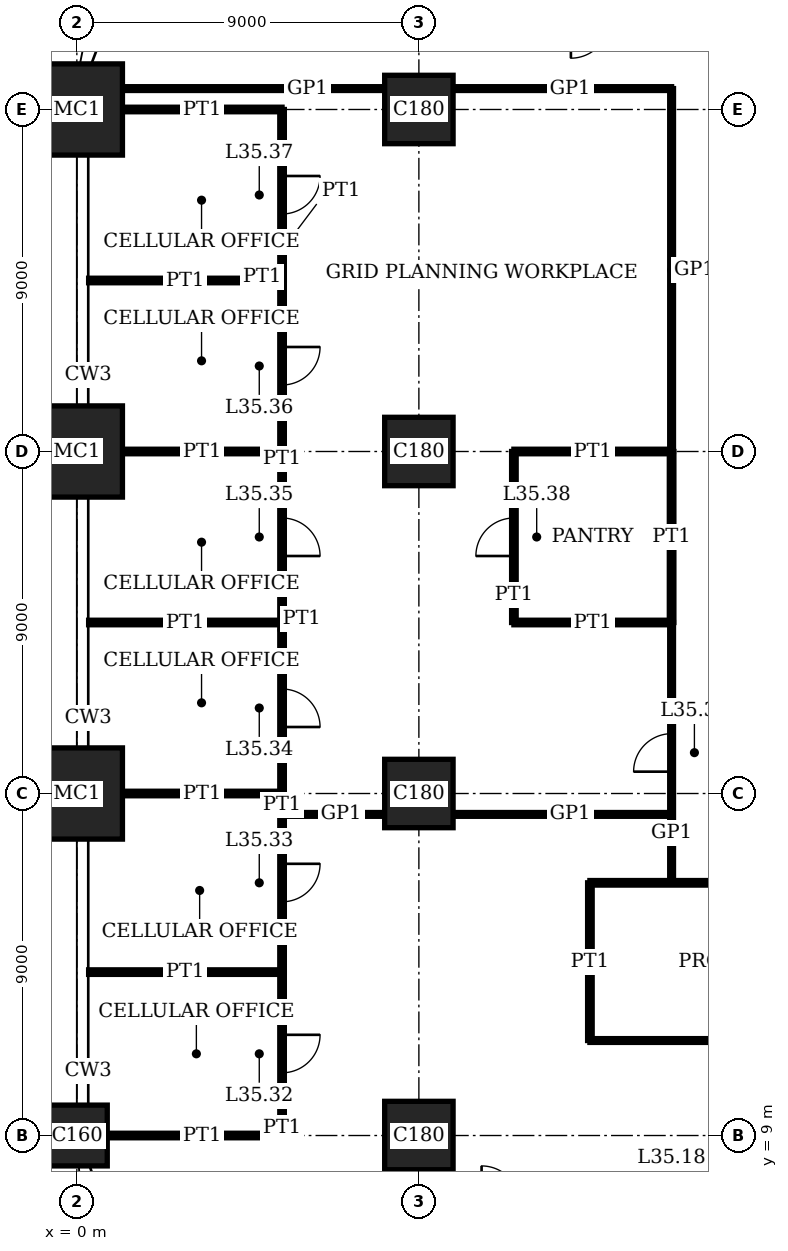
"""IFC4 building model, lengths in metres.
Left out: names, types, materials, properties, quantities, classifications, styles, units other than length and angle.
Written with IfcOpenShell. Run it as: python <this file> out.ifc"""

import sys

from ifc_helpers import new_model, si_unit, direction, frame, frame_2d, origin, origin_2d, place, context, subcontext, project, spatial, rectangle, extrude, element, fill, save


model = new_model("IFC4")
c1 = context("Model", 3, precision=1e-05, world=origin(), true_north=direction((0.0, 1.0)))
c2 = subcontext(c1, "Body", "Model", "MODEL_VIEW")
j1 = project(units=[si_unit("LENGTHUNIT", "METRE"), si_unit("PLANEANGLEUNIT", "RADIAN")], contexts=[c1])
p1 = place(None, origin())
s1 = spatial("IfcSite", under=j1, at=p1, CompositionType="ELEMENT")
p2 = place(p1, origin())
s2 = spatial("IfcBuilding", under=s1, at=p2, CompositionType="ELEMENT")
p3 = place(p2, frame((0.0, 0.0, 145.0)))
s3 = spatial("IfcBuildingStorey", under=s2, at=p3, CompositionType="ELEMENT", Elevation=145.0)
p4 = place(p3, frame((0.0, 9.0, 0.0), z_axis=(0.0, 0.0, 1.0), x_axis=(1.0, 0.0, 0.0)))
e1 = element("IfcColumn", 1, at=p4, inside=s3, PredefinedType="COLUMN", context=c2, shape_type="SweptSolid", body=[
    extrude(rectangle(XDim=1.6, YDim=1.6, at=origin_2d()), origin(), (0.0, 0.0, 1.0), 4.0),
])
for number, where, z_axis, x_axis in (
    (2, (0.0, 18.0, 0.0), (0.0, 0.0, 1.0), (1.0, 0.0, 0.0)),
    (3, (0.0, 27.0, 0.0), (0.0, 0.0, 1.0), (1.0, 0.0, 0.0)),
    (4, (0.0, 36.0, 0.0), (0.0, 0.0, 1.0), (1.0, 0.0, 0.0)),
):
    element("IfcColumn", number, at=place(p3, frame(where, z_axis=z_axis, x_axis=x_axis)), inside=s3, PredefinedType="COLUMN", context=c2, shape_type="SweptSolid", body=[
        extrude(rectangle(XDim=2.4, YDim=2.4, at=origin_2d()), origin(), (0.0, 0.0, 1.0), 4.0),
    ])
for number, where, z_axis, x_axis in (
    (5, (9.0, 9.0, 0.0), (0.0, 0.0, 1.0), (1.0, 0.0, 0.0)),
    (6, (9.0, 18.0, 0.0), (0.0, 0.0, 1.0), (1.0, 0.0, 0.0)),
    (7, (9.0, 27.0, 0.0), (0.0, 0.0, 1.0), (1.0, 0.0, 0.0)),
    (8, (9.0, 36.0, 0.0), (0.0, 0.0, 1.0), (1.0, 0.0, 0.0)),
):
    element("IfcColumn", number, at=place(p3, frame(where, z_axis=z_axis, x_axis=x_axis)), inside=s3, PredefinedType="COLUMN", context=c2, shape_type="SweptSolid", body=[
        extrude(rectangle(XDim=1.8, YDim=1.8, at=origin_2d()), origin(), (0.0, 0.0, 1.0), 4.0),
    ])
p5 = place(p3, frame((0.8, 9.0, 0.0), z_axis=(0.0, 0.0, 1.0), x_axis=(1.0, 0.0, 0.0)))
e9 = element("IfcWall", 9, at=p5, inside=s3, PredefinedType="PARTITIONING", context=c2, shape_type="SweptSolid", body=[
    extrude(rectangle(XDim=4.6, YDim=0.12, at=frame_2d((2.3, 0.0))), origin(), (0.0, 0.0, 1.0), 3.05),
])
p6 = place(p3, frame((13.5, 11.5, 0.0), z_axis=(0.0, 0.0, 1.0), x_axis=(1.0, 0.0, 0.0)))
e10 = element("IfcWall", 10, at=p6, inside=s3, PredefinedType="PARTITIONING", context=c2, shape_type="SweptSolid", body=[
    extrude(rectangle(XDim=9.0, YDim=0.1, at=frame_2d((4.5, 0.0))), origin(), (0.0, 0.0, 1.0), 3.75),
])
p7 = place(p6, frame((4.0, 0.0, 0.0)))
e11 = element("IfcOpeningElement", 11, at=p7, cuts=e10, PredefinedType="OPENING", context=c2, shape_type="SweptSolid", body=[
    extrude(rectangle(XDim=1.0, YDim=2.4, at=frame_2d((0.5, 1.2))), frame((0.0, 0.06, 0.0), z_axis=(0.0, -1.0, 0.0), x_axis=(1.0, 0.0, 0.0)), (0.0, 0.0, 1.0), 0.12),
])
p8 = place(p3, frame((0.31, 13.3, 0.0), z_axis=(0.0, 0.0, 1.0), x_axis=(1.0, 0.0, 0.0)))
e12 = element("IfcWall", 12, at=p8, inside=s3, PredefinedType="PARTITIONING", context=c2, shape_type="SweptSolid", body=[
    extrude(rectangle(XDim=5.09, YDim=0.12, at=frame_2d((2.545, 0.0))), origin(), (0.0, 0.0, 1.0), 3.1),
])
p9 = place(p3, frame((13.5, 15.65, 0.0), z_axis=(0.0, 0.0, 1.0), x_axis=(1.0, 0.0, 0.0)))
e13 = element("IfcWall", 13, at=p9, inside=s3, PredefinedType="PARTITIONING", context=c2, shape_type="SweptSolid", body=[
    extrude(rectangle(XDim=9.0, YDim=0.12, at=frame_2d((4.5, 0.0))), origin(), (0.0, 0.0, 1.0), 3.75),
])
p10 = place(p3, frame((5.39, 17.45, 0.0), z_axis=(0.0, 0.0, 1.0), x_axis=(1.0, 0.0, 0.0)))
e14 = element("IfcWall", 14, at=p10, inside=s3, PredefinedType="PARTITIONING", context=c2, shape_type="SweptSolid", body=[
    extrude(rectangle(XDim=2.71, YDim=0.1, at=frame_2d((1.355, 0.0))), origin(), (0.0, 0.0, 1.0), 3.05),
])
p11 = place(p3, frame((9.9, 17.45, 0.0), z_axis=(0.0, 0.0, 1.0), x_axis=(1.0, 0.0, 0.0)))
e15 = element("IfcWall", 15, at=p11, inside=s3, PredefinedType="PARTITIONING", context=c2, shape_type="SweptSolid", body=[
    extrude(rectangle(XDim=5.75, YDim=0.1, at=frame_2d((2.875, 0.0))), origin(), (0.0, 0.0, 1.0), 3.05),
])
p12 = place(p3, frame((1.2, 18.0, 0.0), z_axis=(0.0, 0.0, 1.0), x_axis=(1.0, 0.0, 0.0)))
e16 = element("IfcWall", 16, at=p12, inside=s3, PredefinedType="PARTITIONING", context=c2, shape_type="SweptSolid", body=[
    extrude(rectangle(XDim=4.2, YDim=0.12, at=frame_2d((2.1, 0.0))), origin(), (0.0, 0.0, 1.0), 3.05),
])
p13 = place(p3, frame((0.31, 22.5, 0.0), z_axis=(0.0, 0.0, 1.0), x_axis=(1.0, 0.0, 0.0)))
e17 = element("IfcWall", 17, at=p13, inside=s3, PredefinedType="PARTITIONING", context=c2, shape_type="SweptSolid", body=[
    extrude(rectangle(XDim=5.09, YDim=0.12, at=frame_2d((2.545, 0.0))), origin(), (0.0, 0.0, 1.0), 3.1),
])
p14 = place(p3, frame((11.5, 22.5, 0.0), z_axis=(0.0, 0.0, 1.0), x_axis=(1.0, 0.0, 0.0)))
e18 = element("IfcWall", 18, at=p14, inside=s3, PredefinedType="PARTITIONING", context=c2, shape_type="SweptSolid", body=[
    extrude(rectangle(XDim=4.15, YDim=0.12, at=frame_2d((2.075, 0.0))), origin(), (0.0, 0.0, 1.0), 3.1),
])
p15 = place(p3, frame((1.2, 27.0, 0.0), z_axis=(0.0, 0.0, 1.0), x_axis=(1.0, 0.0, 0.0)))
e19 = element("IfcWall", 19, at=p15, inside=s3, PredefinedType="PARTITIONING", context=c2, shape_type="SweptSolid", body=[
    extrude(rectangle(XDim=4.2, YDim=0.12, at=frame_2d((2.1, 0.0))), origin(), (0.0, 0.0, 1.0), 3.05),
])
p16 = place(p3, frame((11.5, 27.0, 0.0), z_axis=(0.0, 0.0, 1.0), x_axis=(1.0, 0.0, 0.0)))
e20 = element("IfcWall", 20, at=p16, inside=s3, PredefinedType="PARTITIONING", context=c2, shape_type="SweptSolid", body=[
    extrude(rectangle(XDim=4.15, YDim=0.12, at=frame_2d((2.075, 0.0))), origin(), (0.0, 0.0, 1.0), 3.05),
])
p17 = place(p3, frame((0.31, 31.5, 0.0), z_axis=(0.0, 0.0, 1.0), x_axis=(1.0, 0.0, 0.0)))
e21 = element("IfcWall", 21, at=p17, inside=s3, PredefinedType="PARTITIONING", context=c2, shape_type="SweptSolid", body=[
    extrude(rectangle(XDim=5.09, YDim=0.12, at=frame_2d((2.545, 0.0))), origin(), (0.0, 0.0, 1.0), 3.1),
])
p18 = place(p3, frame((1.2, 36.0, 0.0), z_axis=(0.0, 0.0, 1.0), x_axis=(1.0, 0.0, 0.0)))
e22 = element("IfcWall", 22, at=p18, inside=s3, PredefinedType="PARTITIONING", context=c2, shape_type="SweptSolid", body=[
    extrude(rectangle(XDim=4.2, YDim=0.12, at=frame_2d((2.1, 0.0))), origin(), (0.0, 0.0, 1.0), 3.05),
])
p19 = place(p3, frame((1.2, 36.55, 0.0), z_axis=(0.0, 0.0, 1.0), x_axis=(1.0, 0.0, 0.0)))
e23 = element("IfcWall", 23, at=p19, inside=s3, PredefinedType="PARTITIONING", context=c2, shape_type="SweptSolid", body=[
    extrude(rectangle(XDim=6.9, YDim=0.1, at=frame_2d((3.45, 0.0))), origin(), (0.0, 0.0, 1.0), 3.05),
])
p20 = place(p3, frame((9.9, 36.55, 0.0), z_axis=(0.0, 0.0, 1.0), x_axis=(1.0, 0.0, 0.0)))
e24 = element("IfcWall", 24, at=p20, inside=s3, PredefinedType="PARTITIONING", context=c2, shape_type="SweptSolid", body=[
    extrude(rectangle(XDim=5.75, YDim=0.1, at=frame_2d((2.875, 0.0))), origin(), (0.0, 0.0, 1.0), 3.05),
])
p21 = place(p3, frame((5.4, 9.0, 0.0), z_axis=(0.0, 0.0, 1.0), x_axis=(0.0, 1.0, 0.0)))
e25 = element("IfcWall", 25, at=p21, inside=s3, PredefinedType="PARTITIONING", context=c2, shape_type="SweptSolid", body=[
    extrude(rectangle(XDim=4.3, YDim=0.12, at=frame_2d((2.15, 0.0))), origin(), (0.0, 0.0, 1.0), 3.75),
])
p22 = place(p21, frame((1.65, 0.0, 0.0)))
e26 = element("IfcOpeningElement", 26, at=p22, cuts=e25, PredefinedType="OPENING", context=c2, shape_type="SweptSolid", body=[
    extrude(rectangle(XDim=1.0, YDim=2.4, at=frame_2d((0.5, 1.2))), frame((0.0, 0.07, 0.0), z_axis=(0.0, -1.0, 0.0), x_axis=(1.0, 0.0, 0.0)), (0.0, 0.0, 1.0), 0.14),
])
p23 = place(p3, frame((5.4, 13.3, 0.0), z_axis=(0.0, 0.0, 1.0), x_axis=(0.0, 1.0, 0.0)))
e27 = element("IfcWall", 27, at=p23, inside=s3, PredefinedType="PARTITIONING", context=c2, shape_type="SweptSolid", body=[
    extrude(rectangle(XDim=4.7, YDim=0.12, at=frame_2d((2.35, 0.0))), origin(), (0.0, 0.0, 1.0), 3.75),
])
p24 = place(p23, frame((1.85, 0.0, 0.0)))
e28 = element("IfcOpeningElement", 28, at=p24, cuts=e27, PredefinedType="OPENING", context=c2, shape_type="SweptSolid", body=[
    extrude(rectangle(XDim=1.0, YDim=2.4, at=frame_2d((0.5, 1.2))), frame((0.0, 0.07, 0.0), z_axis=(0.0, -1.0, 0.0), x_axis=(1.0, 0.0, 0.0)), (0.0, 0.0, 1.0), 0.14),
])
p25 = place(p3, frame((5.4, 18.0, 0.0), z_axis=(0.0, 0.0, 1.0), x_axis=(0.0, 1.0, 0.0)))
e29 = element("IfcWall", 29, at=p25, inside=s3, PredefinedType="PARTITIONING", context=c2, shape_type="SweptSolid", body=[
    extrude(rectangle(XDim=4.5, YDim=0.12, at=frame_2d((2.25, 0.0))), origin(), (0.0, 0.0, 1.0), 3.75),
])
p26 = place(p25, frame((1.75, 0.0, 0.0)))
e30 = element("IfcOpeningElement", 30, at=p26, cuts=e29, PredefinedType="OPENING", context=c2, shape_type="SweptSolid", body=[
    extrude(rectangle(XDim=1.0, YDim=2.4, at=frame_2d((0.5, 1.2))), frame((0.0, 0.07, 0.0), z_axis=(0.0, -1.0, 0.0), x_axis=(1.0, 0.0, 0.0)), (0.0, 0.0, 1.0), 0.14),
])
p27 = place(p3, frame((5.4, 22.5, 0.0), z_axis=(0.0, 0.0, 1.0), x_axis=(0.0, 1.0, 0.0)))
e31 = element("IfcWall", 31, at=p27, inside=s3, PredefinedType="PARTITIONING", context=c2, shape_type="SweptSolid", body=[
    extrude(rectangle(XDim=4.5, YDim=0.12, at=frame_2d((2.25, 0.0))), origin(), (0.0, 0.0, 1.0), 3.75),
])
p28 = place(p27, frame((1.75, 0.0, 0.0)))
e32 = element("IfcOpeningElement", 32, at=p28, cuts=e31, PredefinedType="OPENING", context=c2, shape_type="SweptSolid", body=[
    extrude(rectangle(XDim=1.0, YDim=2.4, at=frame_2d((0.5, 1.2))), frame((0.0, 0.07, 0.0), z_axis=(0.0, -1.0, 0.0), x_axis=(1.0, 0.0, 0.0)), (0.0, 0.0, 1.0), 0.14),
])
p29 = place(p3, frame((5.4, 27.0, 0.0), z_axis=(0.0, 0.0, 1.0), x_axis=(0.0, 1.0, 0.0)))
e33 = element("IfcWall", 33, at=p29, inside=s3, PredefinedType="PARTITIONING", context=c2, shape_type="SweptSolid", body=[
    extrude(rectangle(XDim=4.5, YDim=0.12, at=frame_2d((2.25, 0.0))), origin(), (0.0, 0.0, 1.0), 3.75),
])
p30 = place(p29, frame((1.75, 0.0, 0.0)))
e34 = element("IfcOpeningElement", 34, at=p30, cuts=e33, PredefinedType="OPENING", context=c2, shape_type="SweptSolid", body=[
    extrude(rectangle(XDim=1.0, YDim=2.4, at=frame_2d((0.5, 1.2))), frame((0.0, 0.07, 0.0), z_axis=(0.0, -1.0, 0.0), x_axis=(1.0, 0.0, 0.0)), (0.0, 0.0, 1.0), 0.14),
])
p31 = place(p3, frame((5.4, 31.5, 0.0), z_axis=(0.0, 0.0, 1.0), x_axis=(0.0, 1.0, 0.0)))
e35 = element("IfcWall", 35, at=p31, inside=s3, PredefinedType="PARTITIONING", context=c2, shape_type="SweptSolid", body=[
    extrude(rectangle(XDim=4.5, YDim=0.12, at=frame_2d((2.25, 0.0))), origin(), (0.0, 0.0, 1.0), 3.75),
])
p32 = place(p31, frame((1.75, 0.0, 0.0)))
e36 = element("IfcOpeningElement", 36, at=p32, cuts=e35, PredefinedType="OPENING", context=c2, shape_type="SweptSolid", body=[
    extrude(rectangle(XDim=1.0, YDim=2.4, at=frame_2d((0.5, 1.2))), frame((0.0, 0.07, 0.0), z_axis=(0.0, -1.0, 0.0), x_axis=(1.0, 0.0, 0.0)), (0.0, 0.0, 1.0), 0.14),
])
p33 = place(p3, frame((11.5, 22.5, 0.0), z_axis=(0.0, 0.0, 1.0), x_axis=(0.0, 1.0, 0.0)))
e37 = element("IfcWall", 37, at=p33, inside=s3, PredefinedType="PARTITIONING", context=c2, shape_type="SweptSolid", body=[
    extrude(rectangle(XDim=4.5, YDim=0.12, at=frame_2d((2.25, 0.0))), origin(), (0.0, 0.0, 1.0), 3.75),
])
p34 = place(p33, frame((1.75, 0.0, 0.0)))
e38 = element("IfcOpeningElement", 38, at=p34, cuts=e37, PredefinedType="OPENING", context=c2, shape_type="SweptSolid", body=[
    extrude(rectangle(XDim=1.0, YDim=2.4, at=frame_2d((0.5, 1.2))), frame((0.0, 0.07, 0.0), z_axis=(0.0, -1.0, 0.0), x_axis=(1.0, 0.0, 0.0)), (0.0, 0.0, 1.0), 0.14),
])
p35 = place(p3, frame((13.5, 11.5, 0.0), z_axis=(0.0, 0.0, 1.0), x_axis=(0.0, 1.0, 0.0)))
e39 = element("IfcWall", 39, at=p35, inside=s3, PredefinedType="PARTITIONING", context=c2, shape_type="SweptSolid", body=[
    extrude(rectangle(XDim=4.15, YDim=0.12, at=frame_2d((2.075, 0.0))), origin(), (0.0, 0.0, 1.0), 3.75),
])
p36 = place(p3, frame((15.65, 22.5, 0.0), z_axis=(0.0, 0.0, 1.0), x_axis=(0.0, 1.0, 0.0)))
e40 = element("IfcWall", 40, at=p36, inside=s3, PredefinedType="PARTITIONING", context=c2, shape_type="SweptSolid", body=[
    extrude(rectangle(XDim=4.5, YDim=0.12, at=frame_2d((2.25, 0.0))), origin(), (0.0, 0.0, 1.0), 3.75),
])
p37 = place(p3, frame((15.65, 15.65, 0.0), z_axis=(0.0, 0.0, 1.0), x_axis=(0.0, 1.0, 0.0)))
e41 = element("IfcWall", 41, at=p37, inside=s3, PredefinedType="PARTITIONING", context=c2, shape_type="SweptSolid", body=[
    extrude(rectangle(XDim=6.85, YDim=0.1, at=frame_2d((3.425, 0.0))), origin(), (0.0, 0.0, 1.0), 3.75),
])
p38 = place(p37, frame((2.925, 0.0, 0.0)))
e42 = element("IfcOpeningElement", 42, at=p38, cuts=e41, PredefinedType="OPENING", context=c2, shape_type="SweptSolid", body=[
    extrude(rectangle(XDim=1.0, YDim=2.4, at=frame_2d((0.5, 1.2))), frame((0.0, 0.06, 0.0), z_axis=(0.0, -1.0, 0.0), x_axis=(1.0, 0.0, 0.0)), (0.0, 0.0, 1.0), 0.12),
])
p39 = place(p3, frame((15.65, 27.0, 0.0), z_axis=(0.0, 0.0, 1.0), x_axis=(0.0, 1.0, 0.0)))
e43 = element("IfcWall", 43, at=p39, inside=s3, PredefinedType="PARTITIONING", context=c2, shape_type="SweptSolid", body=[
    extrude(rectangle(XDim=9.55, YDim=0.1, at=frame_2d((4.775, 0.0))), origin(), (0.0, 0.0, 1.0), 3.75),
])
p40 = place(p22, origin())
e44 = element("IfcDoor", 44, at=p40, inside=s3, OperationType="SINGLE_SWING_RIGHT", PredefinedType="DOOR", context=c2, shape_type="SweptSolid", body=[
    extrude(rectangle(XDim=1.0, YDim=2.4, at=frame_2d((0.5, 1.2))), frame((0.0, 0.025, 0.0), z_axis=(0.0, -1.0, 0.0), x_axis=(1.0, 0.0, 0.0)), (0.0, 0.0, 1.0), 0.05),
])
fill(e26, e44)
p41 = place(p24, origin())
e45 = element("IfcDoor", 45, at=p41, inside=s3, OperationType="SINGLE_SWING_RIGHT", PredefinedType="DOOR", context=c2, shape_type="SweptSolid", body=[
    extrude(rectangle(XDim=1.0, YDim=2.4, at=frame_2d((0.5, 1.2))), frame((0.0, 0.025, 0.0), z_axis=(0.0, -1.0, 0.0), x_axis=(1.0, 0.0, 0.0)), (0.0, 0.0, 1.0), 0.05),
])
fill(e28, e45)
p42 = place(p26, origin())
e46 = element("IfcDoor", 46, at=p42, inside=s3, OperationType="SINGLE_SWING_LEFT", PredefinedType="DOOR", context=c2, shape_type="SweptSolid", body=[
    extrude(rectangle(XDim=1.0, YDim=2.4, at=frame_2d((0.5, 1.2))), frame((0.0, 0.025, 0.0), z_axis=(0.0, -1.0, 0.0), x_axis=(1.0, 0.0, 0.0)), (0.0, 0.0, 1.0), 0.05),
])
fill(e30, e46)
p43 = place(p28, origin())
e47 = element("IfcDoor", 47, at=p43, inside=s3, OperationType="SINGLE_SWING_LEFT", PredefinedType="DOOR", context=c2, shape_type="SweptSolid", body=[
    extrude(rectangle(XDim=1.0, YDim=2.4, at=frame_2d((0.5, 1.2))), frame((0.0, 0.025, 0.0), z_axis=(0.0, -1.0, 0.0), x_axis=(1.0, 0.0, 0.0)), (0.0, 0.0, 1.0), 0.05),
])
fill(e32, e47)
p44 = place(p30, origin())
e48 = element("IfcDoor", 48, at=p44, inside=s3, OperationType="SINGLE_SWING_RIGHT", PredefinedType="DOOR", context=c2, shape_type="SweptSolid", body=[
    extrude(rectangle(XDim=1.0, YDim=2.4, at=frame_2d((0.5, 1.2))), frame((0.0, 0.025, 0.0), z_axis=(0.0, -1.0, 0.0), x_axis=(1.0, 0.0, 0.0)), (0.0, 0.0, 1.0), 0.05),
])
fill(e34, e48)
p45 = place(p32, origin())
e49 = element("IfcDoor", 49, at=p45, inside=s3, OperationType="SINGLE_SWING_RIGHT", PredefinedType="DOOR", context=c2, shape_type="SweptSolid", body=[
    extrude(rectangle(XDim=1.0, YDim=2.4, at=frame_2d((0.5, 1.2))), frame((0.0, 0.025, 0.0), z_axis=(0.0, -1.0, 0.0), x_axis=(1.0, 0.0, 0.0)), (0.0, 0.0, 1.0), 0.05),
])
fill(e36, e49)
p46 = place(p34, origin())
e50 = element("IfcDoor", 50, at=p46, inside=s3, OperationType="SINGLE_SWING_RIGHT", PredefinedType="DOOR", context=c2, shape_type="SweptSolid", body=[
    extrude(rectangle(XDim=1.0, YDim=2.4, at=frame_2d((0.5, 1.2))), frame((0.0, 0.025, 0.0), z_axis=(0.0, -1.0, 0.0), x_axis=(1.0, 0.0, 0.0)), (0.0, 0.0, 1.0), 0.05),
])
fill(e38, e50)
p47 = place(p38, origin())
e51 = element("IfcDoor", 51, at=p47, inside=s3, OperationType="SINGLE_SWING_RIGHT", PredefinedType="DOOR", context=c2, shape_type="SweptSolid", body=[
    extrude(rectangle(XDim=1.0, YDim=2.4, at=frame_2d((0.5, 1.2))), frame((0.0, 0.02, 0.0), z_axis=(0.0, -1.0, 0.0), x_axis=(1.0, 0.0, 0.0)), (0.0, 0.0, 1.0), 0.04),
])
fill(e42, e51)
save(model, sys.argv[1])
